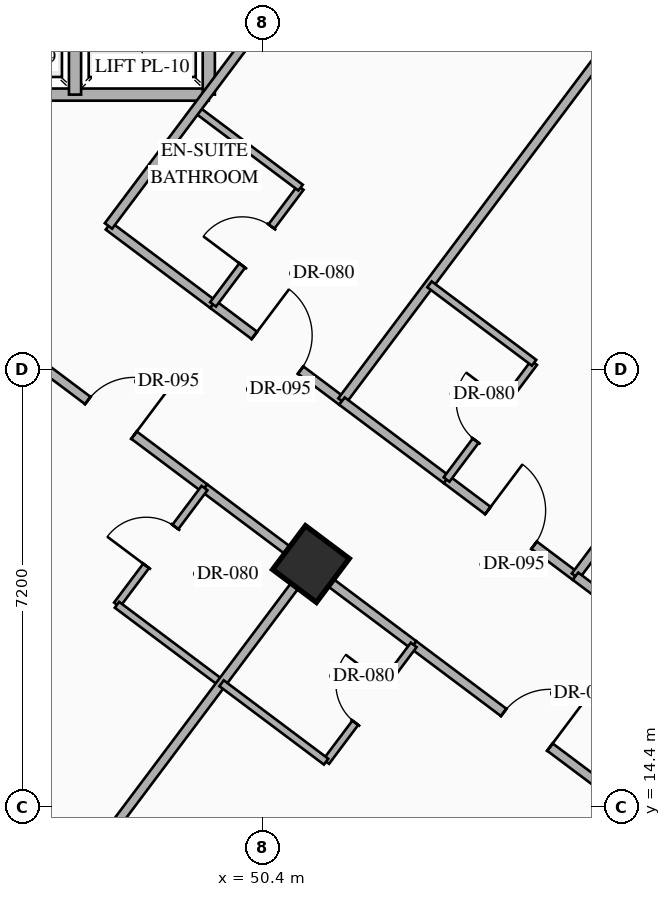
"""IFC4 building model, lengths in metres.
Left out: names, types, materials, properties, quantities, classifications, styles, units other than length and angle.
Written with IfcOpenShell. Run it as: python <this file> out.ifc"""

import sys

from ifc_helpers import new_model, si_unit, direction, frame, frame_2d, origin, origin_2d, place, context, subcontext, project, spatial, rectangle, hollow_rectangle, extrude, element, fill, save


model = new_model("IFC4")
c1 = context("Model", 3, precision=1e-05, world=origin(), true_north=direction((0.0, 1.0)))
c2 = subcontext(c1, "Body", "Model", "MODEL_VIEW")
j1 = project(units=[si_unit("LENGTHUNIT", "METRE"), si_unit("PLANEANGLEUNIT", "RADIAN")], contexts=[c1])
p1 = place(None, origin())
s1 = spatial("IfcSite", under=j1, at=p1, CompositionType="ELEMENT")
p2 = place(p1, origin())
s2 = spatial("IfcBuilding", under=s1, at=p2, CompositionType="ELEMENT")
p3 = place(p2, frame((0.0, 0.0, 81.3)))
s3 = spatial("IfcBuildingStorey", under=s2, at=p3, CompositionType="ELEMENT", Elevation=81.3)
p4 = place(p3, frame((51.2, 18.4, 0.0), z_axis=(0.0, 0.0, 1.0), x_axis=(0.799999996291, -0.600000004945, 0.0)))
e1 = element("IfcColumn", 1, at=p4, inside=s3, PredefinedType="COLUMN", context=c2, shape_type="SweptSolid", body=[
    extrude(hollow_rectangle(XDim=0.9, YDim=0.9, WallThickness=0.036, at=origin_2d()), origin(), (0.0, 0.0, 1.0), 3.35),
])
p5 = place(p3, frame((44.86, 40.73, 0.0), z_axis=(0.0, 0.0, 1.0), x_axis=(0.800006902154, -0.599990797017, 0.0)))
e2 = element("IfcWall", 2, at=p5, inside=s3, PredefinedType="STANDARD", context=c2, shape_type="SweptSolid", body=[
    extrude(rectangle(XDim=29.712, YDim=0.28, at=frame_2d((14.856, 0.0))), origin(), (0.0, 0.0, 1.0), 3.13),
])
p6 = place(p5, frame((14.249, 0.0, 0.0)))
e3 = element("IfcOpeningElement", 3, at=p6, cuts=e2, PredefinedType="OPENING", context=c2, shape_type="SweptSolid", body=[
    extrude(rectangle(XDim=1.1, YDim=2.2, at=frame_2d((0.55, 1.1))), frame((0.0, 0.15, 0.0), z_axis=(0.0, -1.0, 0.0), x_axis=(1.0, 0.0, 0.0)), (0.0, 0.0, 1.0), 0.3),
])
p7 = place(p5, frame((1.612, 0.0, 0.85)))
e4 = element("IfcOpeningElement", 4, at=p7, cuts=e2, PredefinedType="OPENING", context=c2, shape_type="SweptSolid", body=[
    extrude(rectangle(XDim=1.4, YDim=1.8, at=frame_2d((0.7, 0.9))), frame((0.0, 0.15, 0.0), z_axis=(0.0, -1.0, 0.0), x_axis=(1.0, 0.0, 0.0)), (0.0, 0.0, 1.0), 0.3),
])
p8 = place(p5, frame((5.667, 0.0, 0.85)))
e5 = element("IfcOpeningElement", 5, at=p8, cuts=e2, PredefinedType="OPENING", context=c2, shape_type="SweptSolid", body=[
    extrude(rectangle(XDim=1.4, YDim=1.8, at=frame_2d((0.7, 0.9))), frame((0.0, 0.15, 0.0), z_axis=(0.0, -1.0, 0.0), x_axis=(1.0, 0.0, 0.0)), (0.0, 0.0, 1.0), 0.3),
])
p9 = place(p5, frame((9.912, 0.0, 0.85)))
e6 = element("IfcOpeningElement", 6, at=p9, cuts=e2, PredefinedType="OPENING", context=c2, shape_type="SweptSolid", body=[
    extrude(rectangle(XDim=1.4, YDim=1.8, at=frame_2d((0.7, 0.9))), frame((0.0, 0.15, 0.0), z_axis=(0.0, -1.0, 0.0), x_axis=(1.0, 0.0, 0.0)), (0.0, 0.0, 1.0), 0.3),
])
p10 = place(p5, frame((19.528, 0.0, 0.85)))
e7 = element("IfcOpeningElement", 7, at=p10, cuts=e2, PredefinedType="OPENING", context=c2, shape_type="SweptSolid", body=[
    extrude(rectangle(XDim=1.4, YDim=1.8, at=frame_2d((0.7, 0.9))), frame((0.0, 0.15, 0.0), z_axis=(0.0, -1.0, 0.0), x_axis=(1.0, 0.0, 0.0)), (0.0, 0.0, 1.0), 0.3),
])
p11 = place(p5, frame((23.451, 0.0, 0.85)))
e8 = element("IfcOpeningElement", 8, at=p11, cuts=e2, PredefinedType="OPENING", context=c2, shape_type="SweptSolid", body=[
    extrude(rectangle(XDim=1.4, YDim=1.8, at=frame_2d((0.7, 0.9))), frame((0.0, 0.15, 0.0), z_axis=(0.0, -1.0, 0.0), x_axis=(1.0, 0.0, 0.0)), (0.0, 0.0, 1.0), 0.3),
])
p12 = place(p5, frame((27.852, 0.0, 0.85)))
e9 = element("IfcOpeningElement", 9, at=p12, cuts=e2, PredefinedType="OPENING", context=c2, shape_type="SweptSolid", body=[
    extrude(rectangle(XDim=1.4, YDim=1.8, at=frame_2d((0.7, 0.9))), frame((0.0, 0.15, 0.0), z_axis=(0.0, -1.0, 0.0), x_axis=(1.0, 0.0, 0.0)), (0.0, 0.0, 1.0), 0.3),
])
p13 = place(p3, frame((53.318, 2.487, 0.0), z_axis=(0.0, 0.0, 1.0), x_axis=(-0.800004174678, 0.599994433723, 0.0)))
e10 = element("IfcWall", 10, at=p13, inside=s3, PredefinedType="STANDARD", context=c2, shape_type="SweptSolid", body=[
    extrude(rectangle(XDim=35.089, YDim=0.28, at=frame_2d((17.544, 0.0))), origin(), (0.0, 0.0, 1.0), 3.13),
])
p14 = place(p13, frame((1.931, 0.0, 0.85)))
e11 = element("IfcOpeningElement", 11, at=p14, cuts=e10, PredefinedType="OPENING", context=c2, shape_type="SweptSolid", body=[
    extrude(rectangle(XDim=1.4, YDim=1.8, at=frame_2d((0.7, 0.9))), frame((0.0, 0.15, 0.0), z_axis=(0.0, -1.0, 0.0), x_axis=(1.0, 0.0, 0.0)), (0.0, 0.0, 1.0), 0.3),
])
p15 = place(p13, frame((6.819, 0.0, 0.85)))
e12 = element("IfcOpeningElement", 12, at=p15, cuts=e10, PredefinedType="OPENING", context=c2, shape_type="SweptSolid", body=[
    extrude(rectangle(XDim=1.4, YDim=1.8, at=frame_2d((0.7, 0.9))), frame((0.0, 0.15, 0.0), z_axis=(0.0, -1.0, 0.0), x_axis=(1.0, 0.0, 0.0)), (0.0, 0.0, 1.0), 0.3),
])
p16 = place(p13, frame((11.832, 0.0, 0.85)))
e13 = element("IfcOpeningElement", 13, at=p16, cuts=e10, PredefinedType="OPENING", context=c2, shape_type="SweptSolid", body=[
    extrude(rectangle(XDim=1.4, YDim=1.8, at=frame_2d((0.7, 0.9))), frame((0.0, 0.15, 0.0), z_axis=(0.0, -1.0, 0.0), x_axis=(1.0, 0.0, 0.0)), (0.0, 0.0, 1.0), 0.3),
])
p17 = place(p13, frame((17.647, 0.0, 0.85)))
e14 = element("IfcOpeningElement", 14, at=p17, cuts=e10, PredefinedType="OPENING", context=c2, shape_type="SweptSolid", body=[
    extrude(rectangle(XDim=1.4, YDim=1.8, at=frame_2d((0.7, 0.9))), frame((0.0, 0.15, 0.0), z_axis=(0.0, -1.0, 0.0), x_axis=(1.0, 0.0, 0.0)), (0.0, 0.0, 1.0), 0.3),
])
p18 = place(p13, frame((21.857, 0.0, 0.85)))
e15 = element("IfcOpeningElement", 15, at=p18, cuts=e10, PredefinedType="OPENING", context=c2, shape_type="SweptSolid", body=[
    extrude(rectangle(XDim=1.4, YDim=1.8, at=frame_2d((0.7, 0.9))), frame((0.0, 0.15, 0.0), z_axis=(0.0, -1.0, 0.0), x_axis=(1.0, 0.0, 0.0)), (0.0, 0.0, 1.0), 0.3),
])
p19 = place(p13, frame((26.87, 0.0, 0.85)))
e16 = element("IfcOpeningElement", 16, at=p19, cuts=e10, PredefinedType="OPENING", context=c2, shape_type="SweptSolid", body=[
    extrude(rectangle(XDim=1.4, YDim=1.8, at=frame_2d((0.7, 0.9))), frame((0.0, 0.15, 0.0), z_axis=(0.0, -1.0, 0.0), x_axis=(1.0, 0.0, 0.0)), (0.0, 0.0, 1.0), 0.3),
])
p20 = place(p13, frame((31.757, 0.0, 0.85)))
e17 = element("IfcOpeningElement", 17, at=p20, cuts=e10, PredefinedType="OPENING", context=c2, shape_type="SweptSolid", body=[
    extrude(rectangle(XDim=1.4, YDim=1.8, at=frame_2d((0.7, 0.9))), frame((0.0, 0.15, 0.0), z_axis=(0.0, -1.0, 0.0), x_axis=(1.0, 0.0, 0.0)), (0.0, 0.0, 1.0), 0.3),
])
p21 = place(p3, frame((45.12, 26.12, 0.0), z_axis=(0.0, 0.0, 1.0), x_axis=(1.0, 0.0, 0.0)))
e18 = element("IfcWall", 18, at=p21, inside=s3, PredefinedType="STANDARD", context=c2, shape_type="SweptSolid", body=[
    extrude(rectangle(XDim=4.4, YDim=0.2, at=frame_2d((2.2, 0.0))), origin(), (0.0, 0.0, 1.0), 3.13),
])
for number, where, z_axis, x_axis in (
    (19, (49.52, 26.12, 0.0), (0.0, 0.0, 1.0), (0.0, 1.0, 0.0)),
    (20, (47.32, 26.12, 0.0), (0.0, 0.0, 1.0), (0.0, 1.0, 0.0)),
):
    element("IfcWall", number, at=place(p3, frame(where, z_axis=z_axis, x_axis=x_axis)), inside=s3, PredefinedType="STANDARD", context=c2, shape_type="SweptSolid", body=[
        extrude(rectangle(XDim=2.16, YDim=0.2, at=frame_2d((1.08, 0.0))), origin(), (0.0, 0.0, 1.0), 3.13),
    ])
p22 = place(p3, frame((47.87, 23.96, 0.0), z_axis=(0.0, 0.0, 1.0), x_axis=(0.79998637334, -0.60001816845, 0.0)))
e21 = element("IfcWall", 21, at=p22, inside=s3, PredefinedType="PARTITIONING", context=c2, shape_type="SweptSolid", body=[
    extrude(rectangle(XDim=2.15, YDim=0.15, at=frame_2d((1.075, 0.0))), origin(), (0.0, 0.0, 1.0), 2.775),
])
p23 = place(p3, frame((49.59, 22.67, 0.0), z_axis=(0.0, 0.0, 1.0), x_axis=(0.800011056104, -0.599985258246, 0.0)))
e22 = element("IfcWall", 22, at=p23, inside=s3, PredefinedType="PARTITIONING", context=c2, shape_type="SweptSolid", body=[
    extrude(rectangle(XDim=2.65, YDim=0.15, at=frame_2d((1.325, 0.0))), origin(), (0.0, 0.0, 1.0), 2.775),
])
p24 = place(p23, frame((0.85, 0.0, 0.0)))
e23 = element("IfcOpeningElement", 23, at=p24, cuts=e22, PredefinedType="OPENING", context=c2, shape_type="SweptSolid", body=[
    extrude(rectangle(XDim=0.95, YDim=2.15, at=frame_2d((0.475, 1.075))), frame((0.0, 0.085, 0.0), z_axis=(0.0, -1.0, 0.0), x_axis=(1.0, 0.0, 0.0)), (0.0, 0.0, 1.0), 0.17),
])
p25 = place(p3, frame((49.59, 22.67, 0.0), z_axis=(0.0, 0.0, 1.0), x_axis=(0.599951172744, 0.800036618114, 0.0)))
e24 = element("IfcWall", 24, at=p25, inside=s3, PredefinedType="PARTITIONING", context=c2, shape_type="SweptSolid", body=[
    extrude(rectangle(XDim=2.4, YDim=0.12, at=frame_2d((1.2, 0.0))), origin(), (0.0, 0.0, 1.0), 3.13),
])
p26 = place(p25, frame((0.8, 0.0, 0.0)))
e25 = element("IfcOpeningElement", 25, at=p26, cuts=e24, PredefinedType="OPENING", context=c2, shape_type="SweptSolid", body=[
    extrude(rectangle(XDim=0.8, YDim=2.06, at=frame_2d((0.4, 1.03))), frame((0.0, 0.07, 0.0), z_axis=(0.0, -1.0, 0.0), x_axis=(1.0, 0.0, 0.0)), (0.0, 0.0, 1.0), 0.14),
])
p27 = place(p3, frame((49.31, 25.88, 0.0), z_axis=(0.0, 0.0, 1.0), x_axis=(0.800040880289, -0.59994548908, 0.0)))
e26 = element("IfcWall", 26, at=p27, inside=s3, PredefinedType="PARTITIONING", context=c2, shape_type="SweptSolid", body=[
    extrude(rectangle(XDim=2.15, YDim=0.12, at=frame_2d((1.075, 0.0))), origin(), (0.0, 0.0, 1.0), 3.13),
])
for number, where, z_axis, x_axis in (
    (27, (47.87, 23.96, 0.0), (0.0, 0.0, 1.0), (0.6, 0.8, 0.0)),
    (28, (51.71, 21.08, 0.0), (0.0, 0.0, 1.0), (0.6, 0.8, 0.0)),
):
    element("IfcWall", number, at=place(p3, frame(where, z_axis=z_axis, x_axis=x_axis)), inside=s3, PredefinedType="PARTITIONING", context=c2, shape_type="SweptSolid", body=[
        extrude(rectangle(XDim=11.55, YDim=0.15, at=frame_2d((5.775, 0.0))), origin(), (0.0, 0.0, 1.0), 3.13),
    ])
p28 = place(p3, frame((51.71, 21.08, 0.0), z_axis=(0.0, 0.0, 1.0), x_axis=(0.79998637334, -0.60001816845, 0.0)))
e29 = element("IfcWall", 29, at=p28, inside=s3, PredefinedType="PARTITIONING", context=c2, shape_type="SweptSolid", body=[
    extrude(rectangle(XDim=2.15, YDim=0.15, at=frame_2d((1.075, 0.0))), origin(), (0.0, 0.0, 1.0), 2.775),
])
p29 = place(p3, frame((53.43, 19.79, 0.0), z_axis=(0.0, 0.0, 1.0), x_axis=(0.8, -0.6, 0.0)))
e30 = element("IfcWall", 30, at=p29, inside=s3, PredefinedType="PARTITIONING", context=c2, shape_type="SweptSolid", body=[
    extrude(rectangle(XDim=2.65, YDim=0.15, at=frame_2d((1.325, 0.0))), origin(), (0.0, 0.0, 1.0), 2.775),
])
p30 = place(p29, frame((0.85, 0.0, 0.0)))
e31 = element("IfcOpeningElement", 31, at=p30, cuts=e30, PredefinedType="OPENING", context=c2, shape_type="SweptSolid", body=[
    extrude(rectangle(XDim=0.95, YDim=2.15, at=frame_2d((0.475, 1.075))), frame((0.0, 0.085, 0.0), z_axis=(0.0, -1.0, 0.0), x_axis=(1.0, 0.0, 0.0)), (0.0, 0.0, 1.0), 0.17),
])
p31 = place(p3, frame((53.43, 19.79, 0.0), z_axis=(0.0, 0.0, 1.0), x_axis=(0.600065100855, 0.79995117022, 0.0)))
e32 = element("IfcWall", 32, at=p31, inside=s3, PredefinedType="PARTITIONING", context=c2, shape_type="SweptSolid", body=[
    extrude(rectangle(XDim=2.4, YDim=0.12, at=frame_2d((1.2, 0.0))), origin(), (0.0, 0.0, 1.0), 3.13),
])
p32 = place(p31, frame((0.8, 0.0, 0.0)))
e33 = element("IfcOpeningElement", 33, at=p32, cuts=e32, PredefinedType="OPENING", context=c2, shape_type="SweptSolid", body=[
    extrude(rectangle(XDim=0.8, YDim=2.06, at=frame_2d((0.4, 1.03))), frame((0.0, 0.07, 0.0), z_axis=(0.0, -1.0, 0.0), x_axis=(1.0, 0.0, 0.0)), (0.0, 0.0, 1.0), 0.14),
])
p33 = place(p3, frame((53.15, 23.0, 0.0), z_axis=(0.0, 0.0, 1.0), x_axis=(0.800027249606, -0.599963665473, 0.0)))
e34 = element("IfcWall", 34, at=p33, inside=s3, PredefinedType="PARTITIONING", context=c2, shape_type="SweptSolid", body=[
    extrude(rectangle(XDim=2.15, YDim=0.12, at=frame_2d((1.075, 0.0))), origin(), (0.0, 0.0, 1.0), 3.13),
])
p34 = place(p3, frame((55.55, 18.2, 0.0), z_axis=(0.0, 0.0, 1.0), x_axis=(0.599996617946, 0.80000253653, 0.0)))
e35 = element("IfcWall", 35, at=p34, inside=s3, PredefinedType="PARTITIONING", context=c2, shape_type="SweptSolid", body=[
    extrude(rectangle(XDim=11.55, YDim=0.15, at=frame_2d((5.775, 0.0))), origin(), (0.0, 0.0, 1.0), 3.13),
])
p35 = place(p3, frame((55.55, 18.2, 0.0), z_axis=(0.0, 0.0, 1.0), x_axis=(0.79998637334, -0.60001816845, 0.0)))
e36 = element("IfcWall", 36, at=p35, inside=s3, PredefinedType="PARTITIONING", context=c2, shape_type="SweptSolid", body=[
    extrude(rectangle(XDim=2.15, YDim=0.15, at=frame_2d((1.075, 0.0))), origin(), (0.0, 0.0, 1.0), 2.775),
])
p36 = place(p3, frame((46.37, 21.96, 0.0), z_axis=(0.0, 0.0, 1.0), x_axis=(0.799977170108, -0.600030438649, 0.0)))
e37 = element("IfcWall", 37, at=p36, inside=s3, PredefinedType="PARTITIONING", context=c2, shape_type="SweptSolid", body=[
    extrude(rectangle(XDim=3.85, YDim=0.15, at=frame_2d((1.925, 0.0))), origin(), (0.0, 0.0, 1.0), 2.425),
])
p37 = place(p36, frame((1.45, 0.0, 0.0)))
e38 = element("IfcOpeningElement", 38, at=p37, cuts=e37, PredefinedType="OPENING", context=c2, shape_type="SweptSolid", body=[
    extrude(rectangle(XDim=0.95, YDim=2.15, at=frame_2d((0.475, 1.075))), frame((0.0, 0.085, 0.0), z_axis=(0.0, -1.0, 0.0), x_axis=(1.0, 0.0, 0.0)), (0.0, 0.0, 1.0), 0.17),
])
p38 = place(p3, frame((49.45, 19.65, 0.0), z_axis=(0.0, 0.0, 1.0), x_axis=(0.800040880289, -0.59994548908, 0.0)))
e39 = element("IfcWall", 39, at=p38, inside=s3, PredefinedType="PARTITIONING", context=c2, shape_type="SweptSolid", body=[
    extrude(rectangle(XDim=2.15, YDim=0.15, at=frame_2d((1.075, 0.0))), origin(), (0.0, 0.0, 1.0), 2.425),
])
p39 = place(p3, frame((48.01, 17.73, 0.0), z_axis=(0.0, 0.0, 1.0), x_axis=(0.6, 0.8, 0.0)))
e40 = element("IfcWall", 40, at=p39, inside=s3, PredefinedType="PARTITIONING", context=c2, shape_type="SweptSolid", body=[
    extrude(rectangle(XDim=2.4, YDim=0.12, at=frame_2d((1.2, 0.0))), origin(), (0.0, 0.0, 1.0), 3.13),
])
p40 = place(p39, frame((0.8, 0.0, 0.0)))
e41 = element("IfcOpeningElement", 41, at=p40, cuts=e40, PredefinedType="OPENING", context=c2, shape_type="SweptSolid", body=[
    extrude(rectangle(XDim=0.8, YDim=2.06, at=frame_2d((0.4, 1.03))), frame((0.0, 0.07, 0.0), z_axis=(0.0, -1.0, 0.0), x_axis=(1.0, 0.0, 0.0)), (0.0, 0.0, 1.0), 0.14),
])
p41 = place(p3, frame((48.01, 17.73, 0.0), z_axis=(0.0, 0.0, 1.0), x_axis=(0.79998637334, -0.60001816845, 0.0)))
e42 = element("IfcWall", 42, at=p41, inside=s3, PredefinedType="PARTITIONING", context=c2, shape_type="SweptSolid", body=[
    extrude(rectangle(XDim=2.15, YDim=0.12, at=frame_2d((1.075, 0.0))), origin(), (0.0, 0.0, 1.0), 3.13),
])
p42 = place(p3, frame((44.36, 9.28, 0.0), z_axis=(0.0, 0.0, 1.0), x_axis=(0.599986233332, 0.800010324816, 0.0)))
e43 = element("IfcWall", 43, at=p42, inside=s3, PredefinedType="PARTITIONING", context=c2, shape_type="SweptSolid", body=[
    extrude(rectangle(XDim=11.35, YDim=0.15, at=frame_2d((5.675, 0.0))), origin(), (0.0, 0.0, 1.0), 2.425),
])
p43 = place(p3, frame((51.17, 18.36, 0.0), z_axis=(0.0, 0.0, 1.0), x_axis=(0.79998637334, -0.60001816845, 0.0)))
e44 = element("IfcWall", 44, at=p43, inside=s3, PredefinedType="PARTITIONING", context=c2, shape_type="SweptSolid", body=[
    extrude(rectangle(XDim=2.15, YDim=0.15, at=frame_2d((1.075, 0.0))), origin(), (0.0, 0.0, 1.0), 2.425),
])
p44 = place(p3, frame((52.89, 17.07, 0.0), z_axis=(0.0, 0.0, 1.0), x_axis=(0.800012600101, -0.599983199498, 0.0)))
e45 = element("IfcWall", 45, at=p44, inside=s3, PredefinedType="PARTITIONING", context=c2, shape_type="SweptSolid", body=[
    extrude(rectangle(XDim=4.65, YDim=0.15, at=frame_2d((2.325, 0.0))), origin(), (0.0, 0.0, 1.0), 2.425),
])
p45 = place(p44, frame((1.85, 0.0, 0.0)))
e46 = element("IfcOpeningElement", 46, at=p45, cuts=e45, PredefinedType="OPENING", context=c2, shape_type="SweptSolid", body=[
    extrude(rectangle(XDim=0.95, YDim=2.15, at=frame_2d((0.475, 1.075))), frame((0.0, 0.085, 0.0), z_axis=(0.0, -1.0, 0.0), x_axis=(1.0, 0.0, 0.0)), (0.0, 0.0, 1.0), 0.17),
])
p46 = place(p3, frame((51.45, 15.15, 0.0), z_axis=(0.0, 0.0, 1.0), x_axis=(0.599951172744, 0.800036618114, 0.0)))
e47 = element("IfcWall", 47, at=p46, inside=s3, PredefinedType="PARTITIONING", context=c2, shape_type="SweptSolid", body=[
    extrude(rectangle(XDim=2.4, YDim=0.12, at=frame_2d((1.2, 0.0))), origin(), (0.0, 0.0, 1.0), 3.13),
])
p47 = place(p46, frame((0.8, 0.0, 0.0)))
e48 = element("IfcOpeningElement", 48, at=p47, cuts=e47, PredefinedType="OPENING", context=c2, shape_type="SweptSolid", body=[
    extrude(rectangle(XDim=0.8, YDim=2.06, at=frame_2d((0.4, 1.03))), frame((0.0, 0.07, 0.0), z_axis=(0.0, -1.0, 0.0), x_axis=(1.0, 0.0, 0.0)), (0.0, 0.0, 1.0), 0.14),
])
p48 = place(p3, frame((49.73, 16.44, 0.0), z_axis=(0.0, 0.0, 1.0), x_axis=(0.79998637334, -0.60001816845, 0.0)))
e49 = element("IfcWall", 49, at=p48, inside=s3, PredefinedType="PARTITIONING", context=c2, shape_type="SweptSolid", body=[
    extrude(rectangle(XDim=2.15, YDim=0.12, at=frame_2d((1.075, 0.0))), origin(), (0.0, 0.0, 1.0), 3.13),
])
p49 = place(p3, frame((49.8, 5.2, 0.0), z_axis=(0.0, 0.0, 1.0), x_axis=(0.6, 0.8, 0.0)))
e50 = element("IfcWall", 50, at=p49, inside=s3, PredefinedType="PARTITIONING", context=c2, shape_type="SweptSolid", body=[
    extrude(rectangle(XDim=11.35, YDim=0.15, at=frame_2d((5.675, 0.0))), origin(), (0.0, 0.0, 1.0), 3.13),
])
p50 = place(p24, origin())
e51 = element("IfcDoor", 51, at=p50, inside=s3, OperationType="SINGLE_SWING_LEFT", PredefinedType="DOOR", context=c2, shape_type="SweptSolid", body=[
    extrude(rectangle(XDim=0.95, YDim=2.15, at=frame_2d((0.475, 1.075))), frame((0.0, 0.025, 0.0), z_axis=(0.0, -1.0, 0.0), x_axis=(1.0, 0.0, 0.0)), (0.0, 0.0, 1.0), 0.05),
])
fill(e23, e51)
p51 = place(p26, origin())
e52 = element("IfcDoor", 52, at=p51, inside=s3, OperationType="SINGLE_SWING_LEFT", PredefinedType="DOOR", context=c2, shape_type="SweptSolid", body=[
    extrude(rectangle(XDim=0.8, YDim=2.06, at=frame_2d((0.4, 1.03))), frame((0.0, 0.025, 0.0), z_axis=(0.0, -1.0, 0.0), x_axis=(1.0, 0.0, 0.0)), (0.0, 0.0, 1.0), 0.05),
])
fill(e25, e52)
p52 = place(p30, origin())
e53 = element("IfcDoor", 53, at=p52, inside=s3, OperationType="SINGLE_SWING_LEFT", PredefinedType="DOOR", context=c2, shape_type="SweptSolid", body=[
    extrude(rectangle(XDim=0.95, YDim=2.15, at=frame_2d((0.475, 1.075))), frame((0.0, 0.025, 0.0), z_axis=(0.0, -1.0, 0.0), x_axis=(1.0, 0.0, 0.0)), (0.0, 0.0, 1.0), 0.05),
])
fill(e31, e53)
p53 = place(p32, origin())
e54 = element("IfcDoor", 54, at=p53, inside=s3, OperationType="SINGLE_SWING_RIGHT", PredefinedType="DOOR", context=c2, shape_type="SweptSolid", body=[
    extrude(rectangle(XDim=0.8, YDim=2.06, at=frame_2d((0.4, 1.03))), frame((0.0, 0.025, 0.0), z_axis=(0.0, -1.0, 0.0), x_axis=(1.0, 0.0, 0.0)), (0.0, 0.0, 1.0), 0.05),
])
fill(e33, e54)
p54 = place(p37, origin())
e55 = element("IfcDoor", 55, at=p54, inside=s3, OperationType="SINGLE_SWING_RIGHT", PredefinedType="DOOR", context=c2, shape_type="SweptSolid", body=[
    extrude(rectangle(XDim=0.95, YDim=2.15, at=frame_2d((0.475, 1.075))), frame((0.0, 0.025, 0.0), z_axis=(0.0, -1.0, 0.0), x_axis=(1.0, 0.0, 0.0)), (0.0, 0.0, 1.0), 0.05),
])
fill(e38, e55)
p55 = place(p40, origin())
e56 = element("IfcDoor", 56, at=p55, inside=s3, OperationType="SINGLE_SWING_LEFT", PredefinedType="DOOR", context=c2, shape_type="SweptSolid", body=[
    extrude(rectangle(XDim=0.8, YDim=2.06, at=frame_2d((0.4, 1.03))), frame((0.0, 0.025, 0.0), z_axis=(0.0, -1.0, 0.0), x_axis=(1.0, 0.0, 0.0)), (0.0, 0.0, 1.0), 0.05),
])
fill(e41, e56)
p56 = place(p45, origin())
e57 = element("IfcDoor", 57, at=p56, inside=s3, OperationType="SINGLE_SWING_RIGHT", PredefinedType="DOOR", context=c2, shape_type="SweptSolid", body=[
    extrude(rectangle(XDim=0.95, YDim=2.15, at=frame_2d((0.475, 1.075))), frame((0.0, 0.025, 0.0), z_axis=(0.0, -1.0, 0.0), x_axis=(1.0, 0.0, 0.0)), (0.0, 0.0, 1.0), 0.05),
])
fill(e46, e57)
p57 = place(p47, origin())
e58 = element("IfcDoor", 58, at=p57, inside=s3, OperationType="SINGLE_SWING_RIGHT", PredefinedType="DOOR", context=c2, shape_type="SweptSolid", body=[
    extrude(rectangle(XDim=0.8, YDim=2.06, at=frame_2d((0.4, 1.03))), frame((0.0, 0.025, 0.0), z_axis=(0.0, -1.0, 0.0), x_axis=(1.0, 0.0, 0.0)), (0.0, 0.0, 1.0), 0.05),
])
fill(e48, e58)
save(model, sys.argv[1])
